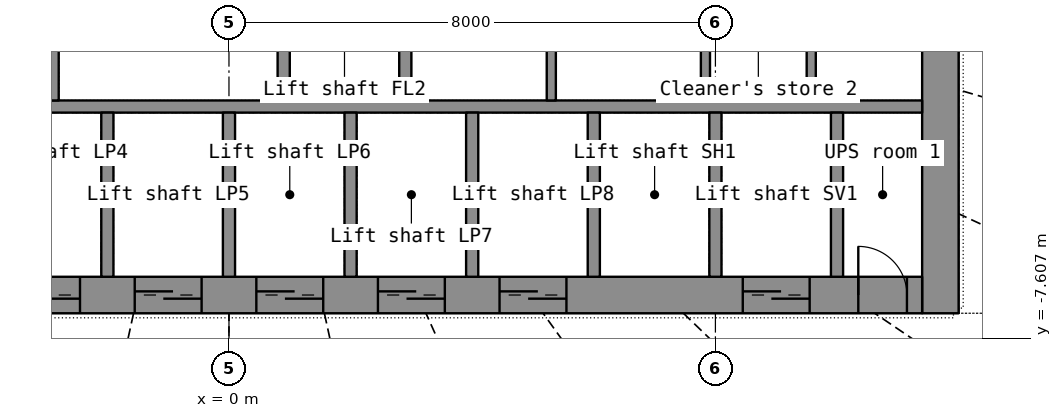
"""IFC4 building model, lengths in metres.
Left out: names, types, materials, properties, quantities, classifications, styles, units other than length and angle.
Written with IfcOpenShell. Run it as: python <this file> out.ifc"""

import sys

from ifc_helpers import new_model, si_unit, direction, frame, frame_2d, origin, place, context, subcontext, project, spatial, rectangle, extrude, element, fill, save


model = new_model("IFC4")
c1 = context("Model", 3, precision=1e-05, world=origin(), true_north=direction((0.0, 1.0)))
c2 = subcontext(c1, "Body", "Model", "MODEL_VIEW")
j1 = project(units=[si_unit("LENGTHUNIT", "METRE"), si_unit("PLANEANGLEUNIT", "RADIAN")], contexts=[c1])
p1 = place(None, origin())
s1 = spatial("IfcSite", under=j1, at=p1, CompositionType="ELEMENT")
p2 = place(p1, origin())
s2 = spatial("IfcBuilding", under=s1, at=p2, CompositionType="ELEMENT")
p3 = place(p2, frame((0.0, 0.0, 74.1)))
s3 = spatial("IfcBuildingStorey", under=s2, at=p3, CompositionType="ELEMENT", Elevation=74.1)
p4 = place(p3, frame((11.7, -7.2, 0.0), z_axis=(0.0, 0.0, 1.0), x_axis=(0.0, 1.0, 0.0)))
e1 = element("IfcWall", 1, at=p4, inside=s3, PredefinedType="SHEAR", context=c2, shape_type="SweptSolid", body=[
    extrude(rectangle(XDim=14.4, YDim=0.6, at=frame_2d((7.2, 0.0))), origin(), (0.0, 0.0, 1.0), 3.3),
])
p5 = place(p4, frame((6.5, 0.0, 0.0)))
e2 = element("IfcOpeningElement", 2, at=p5, cuts=e1, PredefinedType="OPENING", context=c2, shape_type="SweptSolid", body=[
    extrude(rectangle(XDim=1.4, YDim=2.2, at=frame_2d((0.7, 1.1))), frame((0.0, 0.31, 0.0), z_axis=(0.0, -1.0, 0.0), x_axis=(1.0, 0.0, 0.0)), (0.0, 0.0, 1.0), 0.62),
])
p6 = place(p3, frame((-11.4, -6.9, 0.0), z_axis=(0.0, 0.0, 1.0), x_axis=(1.0, 0.0, 0.0)))
e3 = element("IfcWall", 3, at=p6, inside=s3, PredefinedType="SHEAR", context=c2, shape_type="SweptSolid", body=[
    extrude(rectangle(XDim=22.8, YDim=0.6, at=frame_2d((11.4, 0.0))), origin(), (0.0, 0.0, 1.0), 3.3),
])
p7 = place(p6, frame((1.85, 0.0, 0.0)))
e4 = element("IfcOpeningElement", 4, at=p7, cuts=e3, PredefinedType="OPENING", context=c2, shape_type="SweptSolid", body=[
    extrude(rectangle(XDim=1.1, YDim=2.2, at=frame_2d((0.55, 1.1))), frame((0.0, 0.31, 0.0), z_axis=(0.0, -1.0, 0.0), x_axis=(1.0, 0.0, 0.0)), (0.0, 0.0, 1.0), 0.62),
])
p8 = place(p6, frame((3.85, 0.0, 0.0)))
e5 = element("IfcOpeningElement", 5, at=p8, cuts=e3, PredefinedType="OPENING", context=c2, shape_type="SweptSolid", body=[
    extrude(rectangle(XDim=1.1, YDim=2.2, at=frame_2d((0.55, 1.1))), frame((0.0, 0.31, 0.0), z_axis=(0.0, -1.0, 0.0), x_axis=(1.0, 0.0, 0.0)), (0.0, 0.0, 1.0), 0.62),
])
p9 = place(p6, frame((5.85, 0.0, 0.0)))
e6 = element("IfcOpeningElement", 6, at=p9, cuts=e3, PredefinedType="OPENING", context=c2, shape_type="SweptSolid", body=[
    extrude(rectangle(XDim=1.1, YDim=2.2, at=frame_2d((0.55, 1.1))), frame((0.0, 0.31, 0.0), z_axis=(0.0, -1.0, 0.0), x_axis=(1.0, 0.0, 0.0)), (0.0, 0.0, 1.0), 0.62),
])
p10 = place(p6, frame((7.85, 0.0, 0.0)))
e7 = element("IfcOpeningElement", 7, at=p10, cuts=e3, PredefinedType="OPENING", context=c2, shape_type="SweptSolid", body=[
    extrude(rectangle(XDim=1.1, YDim=2.2, at=frame_2d((0.55, 1.1))), frame((0.0, 0.31, 0.0), z_axis=(0.0, -1.0, 0.0), x_axis=(1.0, 0.0, 0.0)), (0.0, 0.0, 1.0), 0.62),
])
p11 = place(p6, frame((9.85, 0.0, 0.0)))
e8 = element("IfcOpeningElement", 8, at=p11, cuts=e3, PredefinedType="OPENING", context=c2, shape_type="SweptSolid", body=[
    extrude(rectangle(XDim=1.1, YDim=2.2, at=frame_2d((0.55, 1.1))), frame((0.0, 0.31, 0.0), z_axis=(0.0, -1.0, 0.0), x_axis=(1.0, 0.0, 0.0)), (0.0, 0.0, 1.0), 0.62),
])
p12 = place(p6, frame((11.85, 0.0, 0.0)))
e9 = element("IfcOpeningElement", 9, at=p12, cuts=e3, PredefinedType="OPENING", context=c2, shape_type="SweptSolid", body=[
    extrude(rectangle(XDim=1.1, YDim=2.2, at=frame_2d((0.55, 1.1))), frame((0.0, 0.31, 0.0), z_axis=(0.0, -1.0, 0.0), x_axis=(1.0, 0.0, 0.0)), (0.0, 0.0, 1.0), 0.62),
])
p13 = place(p6, frame((13.85, 0.0, 0.0)))
e10 = element("IfcOpeningElement", 10, at=p13, cuts=e3, PredefinedType="OPENING", context=c2, shape_type="SweptSolid", body=[
    extrude(rectangle(XDim=1.1, YDim=2.2, at=frame_2d((0.55, 1.1))), frame((0.0, 0.31, 0.0), z_axis=(0.0, -1.0, 0.0), x_axis=(1.0, 0.0, 0.0)), (0.0, 0.0, 1.0), 0.62),
])
p14 = place(p6, frame((15.85, 0.0, 0.0)))
e11 = element("IfcOpeningElement", 11, at=p14, cuts=e3, PredefinedType="OPENING", context=c2, shape_type="SweptSolid", body=[
    extrude(rectangle(XDim=1.1, YDim=2.2, at=frame_2d((0.55, 1.1))), frame((0.0, 0.31, 0.0), z_axis=(0.0, -1.0, 0.0), x_axis=(1.0, 0.0, 0.0)), (0.0, 0.0, 1.0), 0.62),
])
p15 = place(p6, frame((19.85, 0.0, 0.0)))
e12 = element("IfcOpeningElement", 12, at=p15, cuts=e3, PredefinedType="OPENING", context=c2, shape_type="SweptSolid", body=[
    extrude(rectangle(XDim=1.1, YDim=2.2, at=frame_2d((0.55, 1.1))), frame((0.0, 0.31, 0.0), z_axis=(0.0, -1.0, 0.0), x_axis=(1.0, 0.0, 0.0)), (0.0, 0.0, 1.0), 0.62),
])
p16 = place(p6, frame((0.25, 0.0, 0.0)))
e13 = element("IfcOpeningElement", 13, at=p16, cuts=e3, PredefinedType="OPENING", context=c2, shape_type="SweptSolid", body=[
    extrude(rectangle(XDim=0.8, YDim=2.05, at=frame_2d((0.4, 1.025))), frame((0.0, 0.31, 0.0), z_axis=(0.0, -1.0, 0.0), x_axis=(1.0, 0.0, 0.0)), (0.0, 0.0, 1.0), 0.62),
])
p17 = place(p6, frame((21.75, 0.0, 0.0)))
e14 = element("IfcOpeningElement", 14, at=p17, cuts=e3, PredefinedType="OPENING", context=c2, shape_type="SweptSolid", body=[
    extrude(rectangle(XDim=0.8, YDim=2.05, at=frame_2d((0.4, 1.025))), frame((0.0, 0.31, 0.0), z_axis=(0.0, -1.0, 0.0), x_axis=(1.0, 0.0, 0.0)), (0.0, 0.0, 1.0), 0.62),
])
p18 = place(p3, frame((-11.4, -3.8, 0.0), z_axis=(0.0, 0.0, 1.0), x_axis=(1.0, 0.0, 0.0)))
e15 = element("IfcWall", 15, at=p18, inside=s3, PredefinedType="SHEAR", context=c2, shape_type="SweptSolid", body=[
    extrude(rectangle(XDim=22.8, YDim=0.2, at=frame_2d((11.4, 0.0))), origin(), (0.0, 0.0, 1.0), 3.3),
])
for number, where, z_axis, x_axis in (
    (16, (-2.0, -6.6, 0.0), (0.0, 0.0, 1.0), (0.0, 1.0, 0.0)),
    (17, (0.0, -6.6, 0.0), (0.0, 0.0, 1.0), (0.0, 1.0, 0.0)),
    (18, (2.0, -6.6, 0.0), (0.0, 0.0, 1.0), (0.0, 1.0, 0.0)),
    (19, (4.0, -6.6, 0.0), (0.0, 0.0, 1.0), (0.0, 1.0, 0.0)),
    (20, (6.0, -6.6, 0.0), (0.0, 0.0, 1.0), (0.0, 1.0, 0.0)),
    (21, (8.0, -6.6, 0.0), (0.0, 0.0, 1.0), (0.0, 1.0, 0.0)),
    (22, (10.0, -6.6, 0.0), (0.0, 0.0, 1.0), (0.0, 1.0, 0.0)),
):
    element("IfcWall", number, at=place(p3, frame(where, z_axis=z_axis, x_axis=x_axis)), inside=s3, PredefinedType="SHEAR", context=c2, shape_type="SweptSolid", body=[
        extrude(rectangle(XDim=2.7, YDim=0.2, at=frame_2d((1.35, 0.0))), origin(), (0.0, 0.0, 1.0), 3.3),
    ])
p19 = place(p3, frame((-2.9, -3.7, 0.0), z_axis=(0.0, 0.0, 1.0), x_axis=(0.0, 1.0, 0.0)))
e23 = element("IfcWall", 23, at=p19, inside=s3, PredefinedType="SHEAR", context=c2, shape_type="SweptSolid", body=[
    extrude(rectangle(XDim=7.4, YDim=0.2, at=frame_2d((3.7, 0.0))), origin(), (0.0, 0.0, 1.0), 3.3),
])
p20 = place(p19, frame((3.1, 0.0, 0.0)))
e24 = element("IfcOpeningElement", 24, at=p20, cuts=e23, PredefinedType="OPENING", context=c2, shape_type="SweptSolid", body=[
    extrude(rectangle(XDim=1.2, YDim=2.2, at=frame_2d((0.6, 1.1))), frame((0.0, 0.11, 0.0), z_axis=(0.0, -1.0, 0.0), x_axis=(1.0, 0.0, 0.0)), (0.0, 0.0, 1.0), 0.22),
])
p21 = place(p3, frame((2.9, -3.7, 0.0), z_axis=(0.0, 0.0, 1.0), x_axis=(0.0, 1.0, 0.0)))
e25 = element("IfcWall", 25, at=p21, inside=s3, PredefinedType="SHEAR", context=c2, shape_type="SweptSolid", body=[
    extrude(rectangle(XDim=7.4, YDim=0.2, at=frame_2d((3.7, 0.0))), origin(), (0.0, 0.0, 1.0), 3.3),
])
p22 = place(p21, frame((3.1, 0.0, 0.0)))
e26 = element("IfcOpeningElement", 26, at=p22, cuts=e25, PredefinedType="OPENING", context=c2, shape_type="SweptSolid", body=[
    extrude(rectangle(XDim=1.2, YDim=2.2, at=frame_2d((0.6, 1.1))), frame((0.0, 0.11, 0.0), z_axis=(0.0, -1.0, 0.0), x_axis=(1.0, 0.0, 0.0)), (0.0, 0.0, 1.0), 0.22),
])
p23 = place(p3, frame((0.9, -3.7, 0.0), z_axis=(0.0, 0.0, 1.0), x_axis=(0.0, 1.0, 0.0)))
e27 = element("IfcWall", 27, at=p23, inside=s3, PredefinedType="SHEAR", context=c2, shape_type="SweptSolid", body=[
    extrude(rectangle(XDim=2.35, YDim=0.2, at=frame_2d((1.175, 0.0))), origin(), (0.0, 0.0, 1.0), 3.3),
])
for number, where, z_axis, x_axis in (
    (28, (5.301, -3.7, 0.0), (0.0, 0.0, 1.0), (0.0, 1.0, 0.0)),
    (29, (7.836, -3.7, 0.0), (0.0, 0.0, 1.0), (0.0, 1.0, 0.0)),
    (30, (9.576, -3.7, 0.0), (0.0, 0.0, 1.0), (0.0, 1.0, 0.0)),
):
    element("IfcWall", number, at=place(p3, frame(where, z_axis=z_axis, x_axis=x_axis)), inside=s3, PredefinedType="PARTITIONING", context=c2, shape_type="SweptSolid", body=[
        extrude(rectangle(XDim=2.35, YDim=0.15, at=frame_2d((1.175, 0.0))), origin(), (0.0, 0.0, 1.0), 3.3),
    ])
p24 = place(p10, origin())
e31 = element("IfcDoor", 31, at=p24, inside=s3, OperationType="DOUBLE_DOOR_SLIDING", PredefinedType="DOOR", context=c2, shape_type="SweptSolid", body=[
    extrude(rectangle(XDim=1.1, YDim=2.2, at=frame_2d((0.55, 1.1))), frame((0.0, 0.025, 0.0), z_axis=(0.0, -1.0, 0.0), x_axis=(1.0, 0.0, 0.0)), (0.0, 0.0, 1.0), 0.05),
])
fill(e7, e31)
p25 = place(p11, origin())
e32 = element("IfcDoor", 32, at=p25, inside=s3, OperationType="DOUBLE_DOOR_SLIDING", PredefinedType="DOOR", context=c2, shape_type="SweptSolid", body=[
    extrude(rectangle(XDim=1.1, YDim=2.2, at=frame_2d((0.55, 1.1))), frame((0.0, 0.025, 0.0), z_axis=(0.0, -1.0, 0.0), x_axis=(1.0, 0.0, 0.0)), (0.0, 0.0, 1.0), 0.05),
])
fill(e8, e32)
p26 = place(p12, origin())
e33 = element("IfcDoor", 33, at=p26, inside=s3, OperationType="DOUBLE_DOOR_SLIDING", PredefinedType="DOOR", context=c2, shape_type="SweptSolid", body=[
    extrude(rectangle(XDim=1.1, YDim=2.2, at=frame_2d((0.55, 1.1))), frame((0.0, 0.025, 0.0), z_axis=(0.0, -1.0, 0.0), x_axis=(1.0, 0.0, 0.0)), (0.0, 0.0, 1.0), 0.05),
])
fill(e9, e33)
p27 = place(p13, origin())
e34 = element("IfcDoor", 34, at=p27, inside=s3, OperationType="DOUBLE_DOOR_SLIDING", PredefinedType="DOOR", context=c2, shape_type="SweptSolid", body=[
    extrude(rectangle(XDim=1.1, YDim=2.2, at=frame_2d((0.55, 1.1))), frame((0.0, 0.025, 0.0), z_axis=(0.0, -1.0, 0.0), x_axis=(1.0, 0.0, 0.0)), (0.0, 0.0, 1.0), 0.05),
])
fill(e10, e34)
p28 = place(p14, origin())
e35 = element("IfcDoor", 35, at=p28, inside=s3, OperationType="DOUBLE_DOOR_SLIDING", PredefinedType="DOOR", context=c2, shape_type="SweptSolid", body=[
    extrude(rectangle(XDim=1.1, YDim=2.2, at=frame_2d((0.55, 1.1))), frame((0.0, 0.025, 0.0), z_axis=(0.0, -1.0, 0.0), x_axis=(1.0, 0.0, 0.0)), (0.0, 0.0, 1.0), 0.05),
])
fill(e11, e35)
p29 = place(p15, origin())
e36 = element("IfcDoor", 36, at=p29, inside=s3, OperationType="DOUBLE_DOOR_SLIDING", PredefinedType="DOOR", context=c2, shape_type="SweptSolid", body=[
    extrude(rectangle(XDim=1.1, YDim=2.2, at=frame_2d((0.55, 1.1))), frame((0.0, 0.025, 0.0), z_axis=(0.0, -1.0, 0.0), x_axis=(1.0, 0.0, 0.0)), (0.0, 0.0, 1.0), 0.05),
])
fill(e12, e36)
p30 = place(p17, origin())
e37 = element("IfcDoor", 37, at=p30, inside=s3, OperationType="SINGLE_SWING_LEFT", PredefinedType="DOOR", context=c2, shape_type="SweptSolid", body=[
    extrude(rectangle(XDim=0.8, YDim=2.05, at=frame_2d((0.4, 1.025))), frame((0.0, 0.025, 0.0), z_axis=(0.0, -1.0, 0.0), x_axis=(1.0, 0.0, 0.0)), (0.0, 0.0, 1.0), 0.05),
])
fill(e14, e37)
save(model, sys.argv[1])
